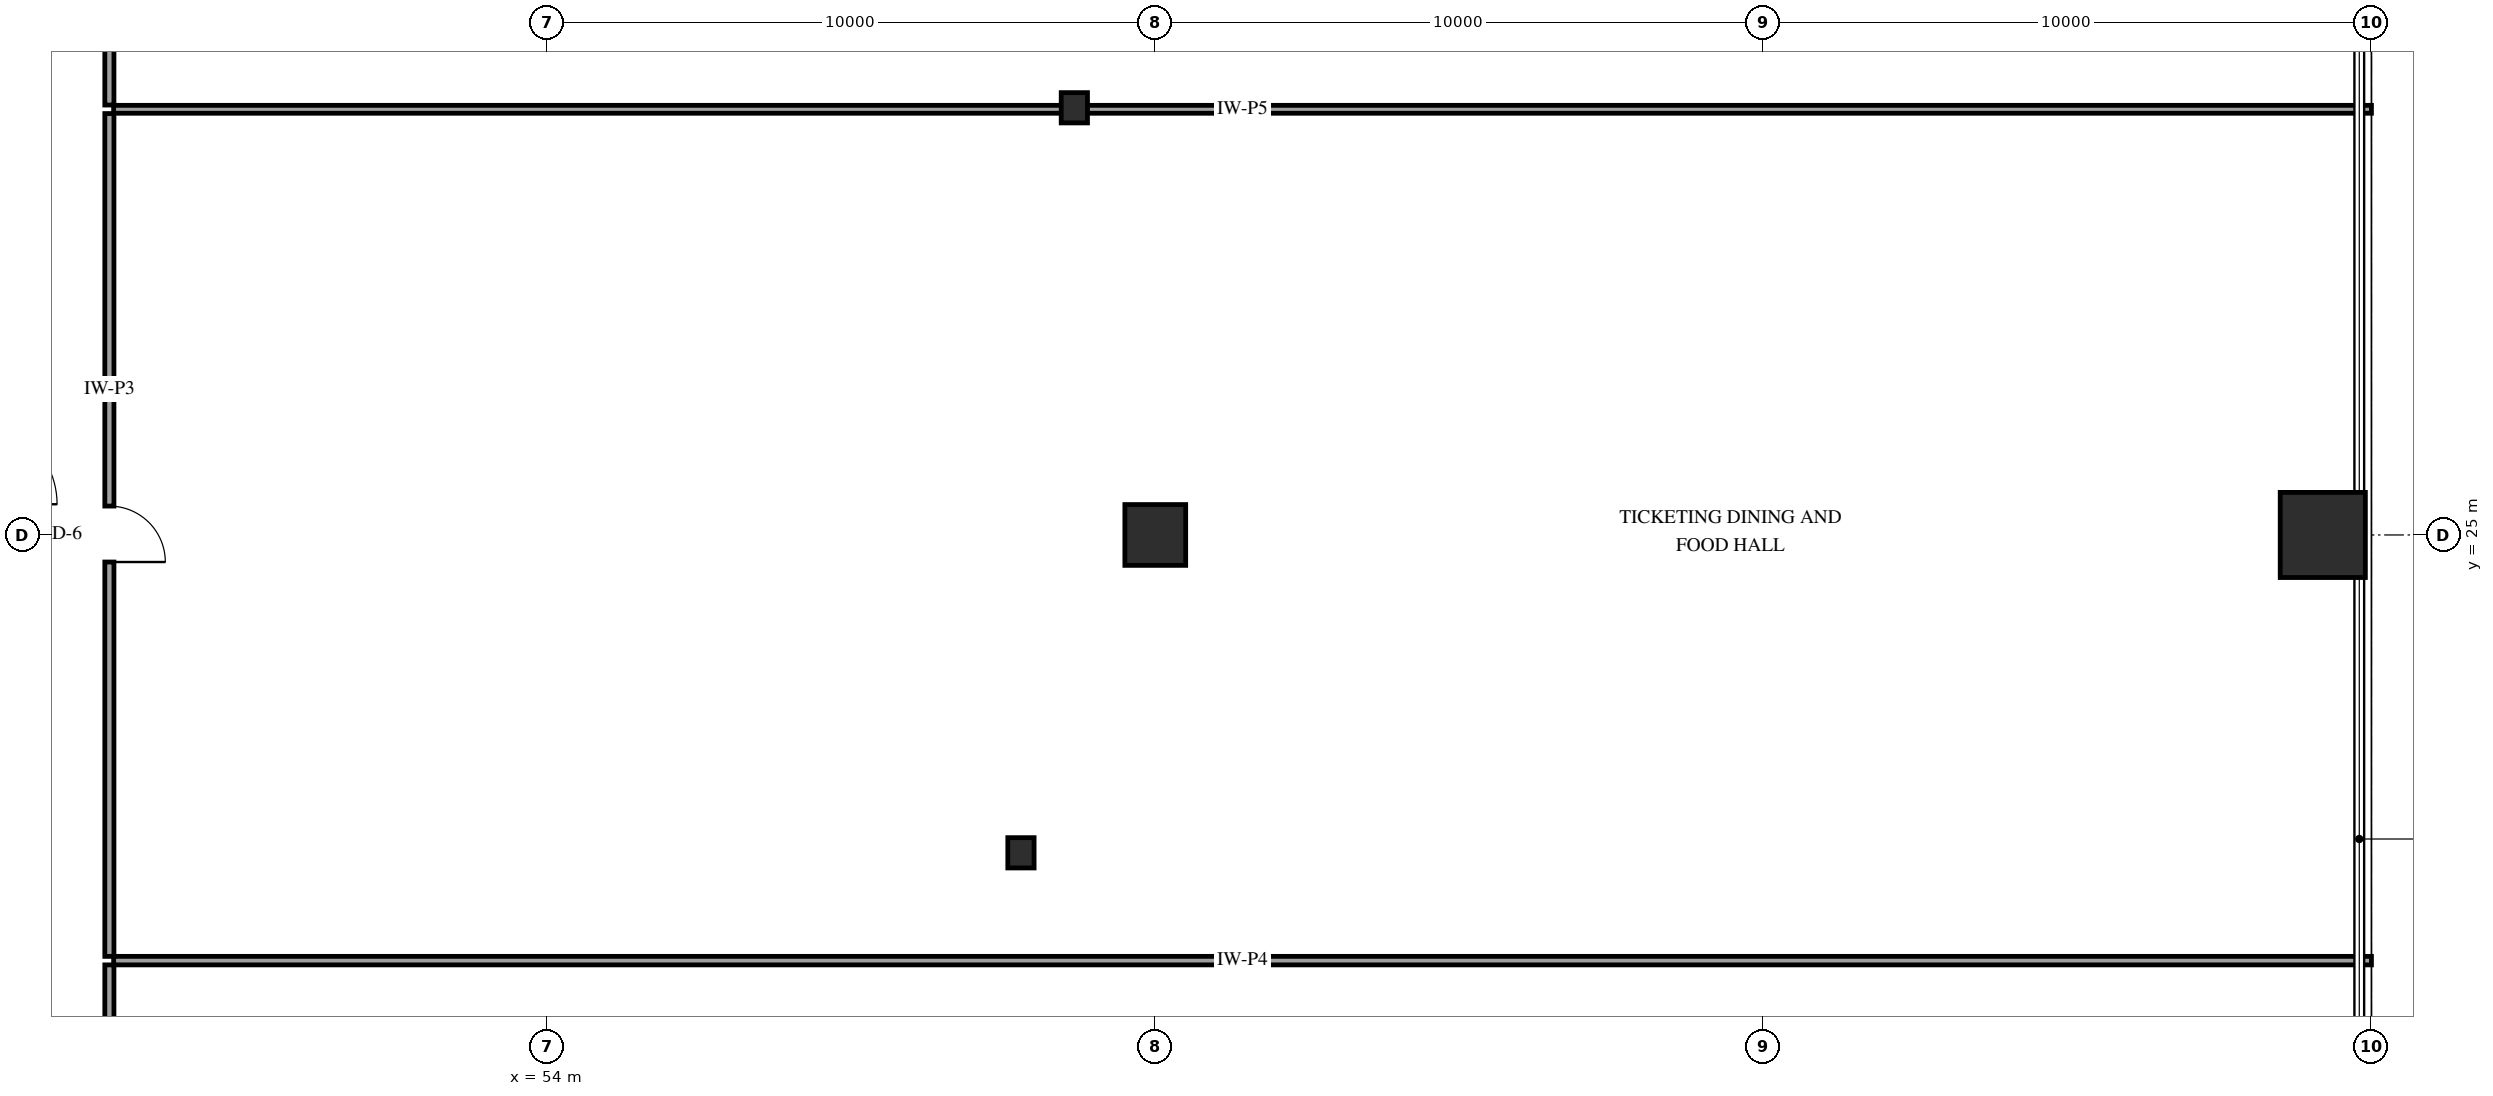
"""IFC4 building model, lengths in metres.
Left out: names, types, materials, properties, quantities, classifications, styles, units other than length and angle.
Written with IfcOpenShell. Run it as: python <this file> out.ifc"""

import sys

from ifc_helpers import new_model, si_unit, direction, frame, frame_2d, origin, origin_2d, place, context, subcontext, project, spatial, rectangle, i_section, extrude, element, fill, save


model = new_model("IFC4")
c1 = context("Model", 3, precision=1e-05, world=origin(), true_north=direction((0.0, 1.0)))
c2 = subcontext(c1, "Body", "Model", "MODEL_VIEW")
j1 = project(units=[si_unit("LENGTHUNIT", "METRE"), si_unit("PLANEANGLEUNIT", "RADIAN")], contexts=[c1])
p1 = place(None, origin())
s1 = spatial("IfcSite", under=j1, at=p1, CompositionType="ELEMENT")
p2 = place(p1, origin())
s2 = spatial("IfcBuilding", under=s1, at=p2, CompositionType="ELEMENT")
p3 = place(p2, frame((0.0, 0.0, 6.0)))
s3 = spatial("IfcBuildingStorey", under=s2, at=p3, CompositionType="ELEMENT", Elevation=6.0)
p4 = place(p3, frame((64.0, 25.0, 0.0), z_axis=(0.0, 0.0, 1.0), x_axis=(1.0, 0.0, 0.0)))
e1 = element("IfcColumn", 1, at=p4, inside=s3, PredefinedType="COLUMN", context=c2, shape_type="SweptSolid", body=[
    extrude(rectangle(XDim=1.0, YDim=1.0, at=origin_2d()), origin(), (0.0, 0.0, 1.0), 5.4),
])
p5 = place(p3, frame((83.2, 25.0, 0.0), z_axis=(0.0, 0.0, 1.0), x_axis=(1.0, 0.0, 0.0)))
e2 = element("IfcColumn", 2, at=p5, inside=s3, PredefinedType="COLUMN", context=c2, shape_type="SweptSolid", body=[
    extrude(rectangle(XDim=1.4, YDim=1.4, at=origin_2d()), origin(), (0.0, 0.0, 1.0), 5.4),
])
for number, where, z_axis, x_axis in (
    (3, (62.669, 32.025, 0.0), (0.0, 0.0, 1.0), (1.0, 0.0, 0.0)),
    (4, (61.791, 19.773, 0.0), (0.0, 0.0, 1.0), (1.0, 0.0, 0.0)),
):
    element("IfcColumn", number, at=place(p3, frame(where, z_axis=z_axis, x_axis=x_axis)), inside=s3, PredefinedType="COLUMN", context=c2, shape_type="SweptSolid", body=[
        extrude(i_section(OverallWidth=0.432, OverallDepth=0.498, WebThickness=0.056, FlangeThickness=0.089, FilletRadius=0.038, at=origin_2d()), origin(), (0.0, 0.0, 1.0), 5.4),
    ])
p6 = place(p3, frame((46.87, 18.0, 0.0), z_axis=(0.0, 0.0, 1.0), x_axis=(1.0, 0.0, 0.0)))
e5 = element("IfcWall", 5, at=p6, inside=s3, PredefinedType="PARTITIONING", context=c2, shape_type="SweptSolid", body=[
    extrude(rectangle(XDim=37.13, YDim=0.14, at=frame_2d((18.565, 0.0))), origin(), (0.0, 0.0, 1.0), 5.08),
])
p7 = place(p3, frame((46.87, 32.0, 0.0), z_axis=(0.0, 0.0, 1.0), x_axis=(1.0, 0.0, 0.0)))
e6 = element("IfcWall", 6, at=p7, inside=s3, PredefinedType="PARTITIONING", context=c2, shape_type="SweptSolid", body=[
    extrude(rectangle(XDim=37.13, YDim=0.13, at=frame_2d((18.565, 0.0))), origin(), (0.0, 0.0, 1.0), 5.08),
])
p8 = place(p3, frame((46.8, 31.93, 0.0), z_axis=(0.0, 0.0, 1.0), x_axis=(0.0, -1.0, 0.0)))
e7 = element("IfcWall", 7, at=p8, inside=s3, PredefinedType="PARTITIONING", context=c2, shape_type="SweptSolid", body=[
    extrude(rectangle(XDim=13.86, YDim=0.15, at=frame_2d((6.93, 0.0))), origin(), (0.0, 0.0, 1.0), 5.08),
])
p9 = place(p8, frame((6.455, 0.0, 0.0)))
e8 = element("IfcOpeningElement", 8, at=p9, cuts=e7, PredefinedType="OPENING", context=c2, shape_type="SweptSolid", body=[
    extrude(rectangle(XDim=0.92, YDim=2.12, at=frame_2d((0.46, 1.06))), frame((0.0, 0.085, 0.0), z_axis=(0.0, -1.0, 0.0), x_axis=(1.0, 0.0, 0.0)), (0.0, 0.0, 1.0), 0.17),
])
p10 = place(p3, frame((46.8, 42.93, 0.0), z_axis=(0.0, 0.0, 1.0), x_axis=(0.0, -1.0, 0.0)))
e9 = element("IfcWall", 9, at=p10, inside=s3, PredefinedType="PARTITIONING", context=c2, shape_type="SweptSolid", body=[
    extrude(rectangle(XDim=10.86, YDim=0.15, at=frame_2d((5.43, 0.0))), origin(), (0.0, 0.0, 1.0), 5.08),
])
p11 = place(p3, frame((46.8, 17.93, 0.0), z_axis=(0.0, 0.0, 1.0), x_axis=(0.0, -1.0, 0.0)))
e10 = element("IfcWall", 10, at=p11, inside=s3, PredefinedType="PARTITIONING", context=c2, shape_type="SweptSolid", body=[
    extrude(rectangle(XDim=6.06, YDim=0.15, at=frame_2d((3.03, 0.0))), origin(), (0.0, 0.0, 1.0), 5.08),
])
p12 = place(p9, origin())
e11 = element("IfcDoor", 11, at=p12, inside=s3, OperationType="SINGLE_SWING_RIGHT", PredefinedType="DOOR", context=c2, shape_type="SweptSolid", body=[
    extrude(rectangle(XDim=0.92, YDim=2.12, at=frame_2d((0.46, 1.06))), frame((0.0, 0.025, 0.0), z_axis=(0.0, -1.0, 0.0), x_axis=(1.0, 0.0, 0.0)), (0.0, 0.0, 1.0), 0.05),
])
fill(e8, e11)
save(model, sys.argv[1])
